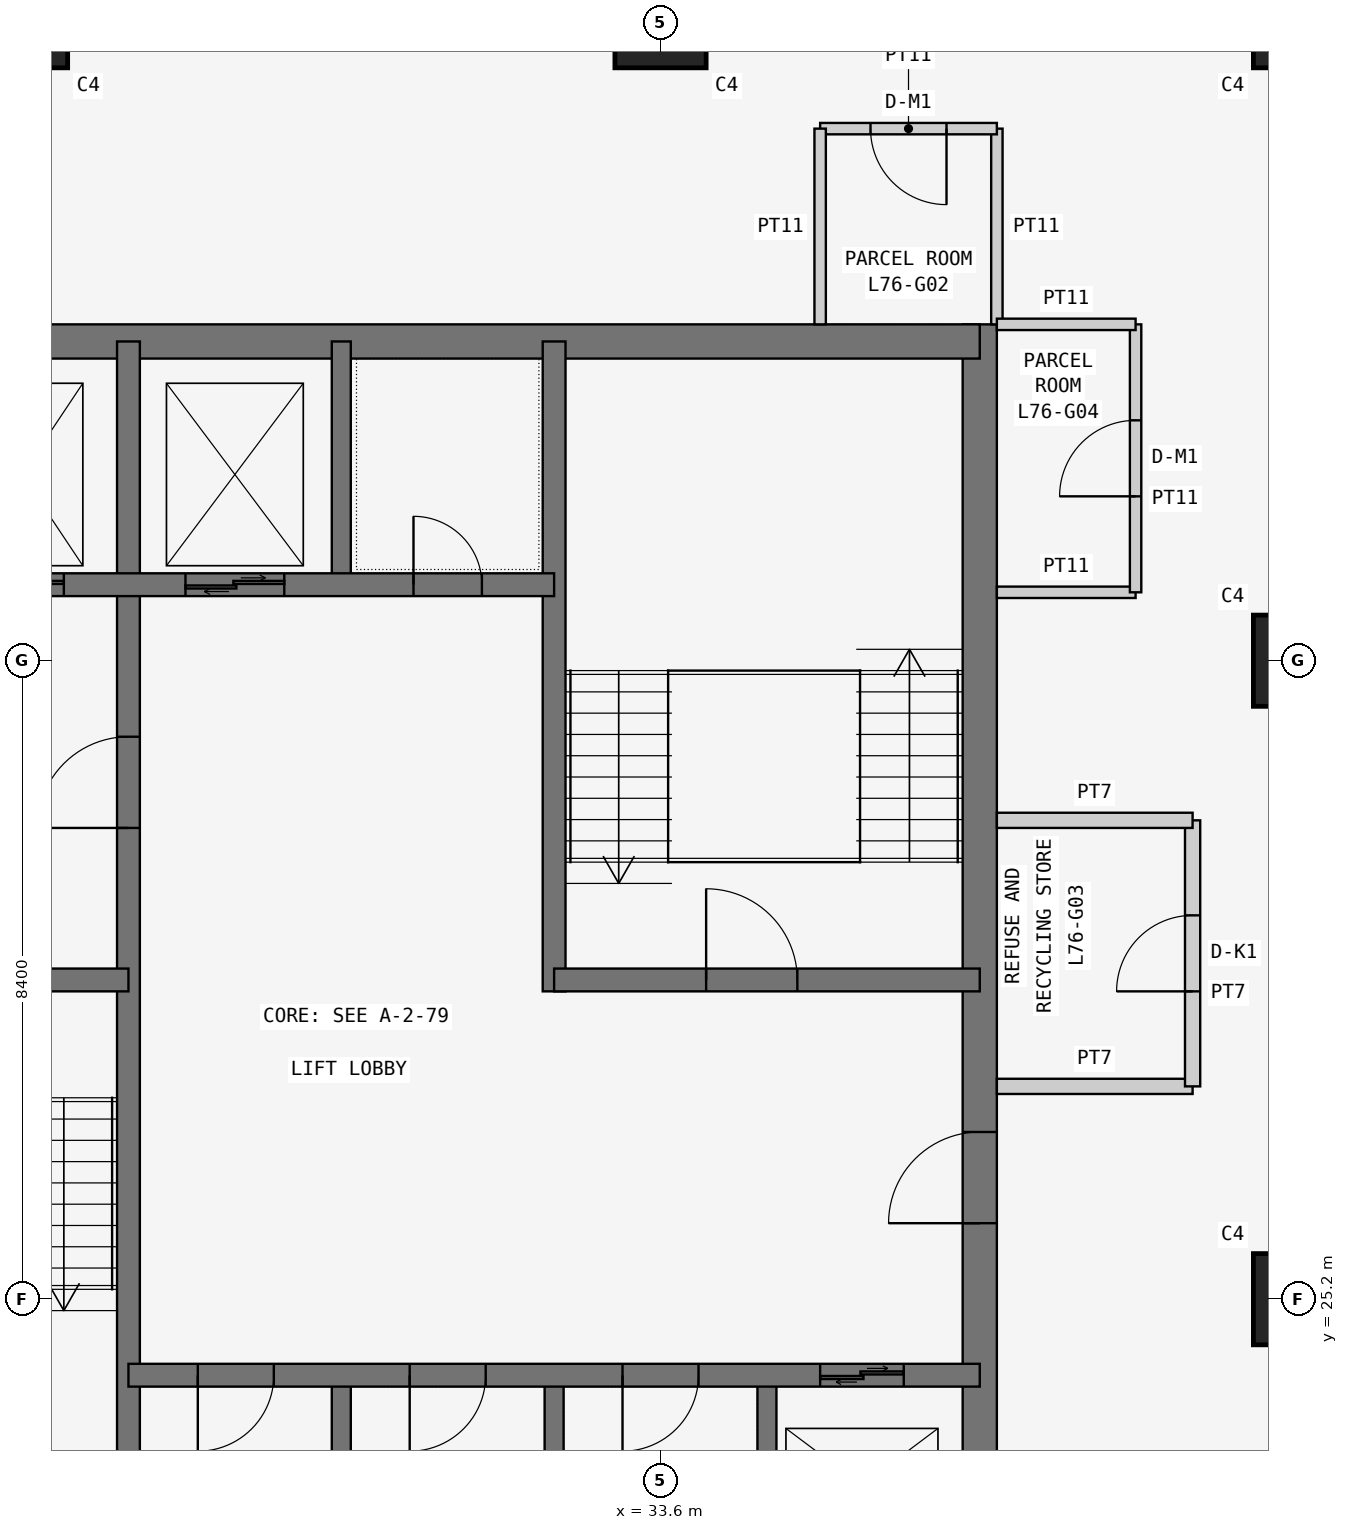
"""IFC4 building model, lengths in metres.
Left out: names, types, materials, properties, quantities, classifications, styles, units other than length and angle.
Written with IfcOpenShell. Run it as: python <this file> out.ifc"""

import sys

from ifc_helpers import new_model, si_unit, direction, frame, frame_2d, origin, origin_2d, place, context, subcontext, project, spatial, rectangle, extrude, element, fill, save


model = new_model("IFC4")
c1 = context("Model", 3, precision=1e-05, world=origin(), true_north=direction((0.0, 1.0)))
c2 = subcontext(c1, "Body", "Model", "MODEL_VIEW")
j1 = project(units=[si_unit("LENGTHUNIT", "METRE"), si_unit("PLANEANGLEUNIT", "RADIAN")], contexts=[c1])
p1 = place(None, origin())
s1 = spatial("IfcSite", under=j1, at=p1, CompositionType="ELEMENT")
p2 = place(p1, origin())
s2 = spatial("IfcBuilding", under=s1, at=p2, CompositionType="ELEMENT")
p3 = place(p2, frame((0.0, 0.0, 290.1)))
s3 = spatial("IfcBuildingStorey", under=s2, at=p3, CompositionType="ELEMENT", Elevation=290.1)
for number, where, z_axis, x_axis in (
    (1, (25.2, 42.0, 0.0), (0.0, 0.0, 1.0), (1.0, 0.0, 0.0)),
    (2, (33.6, 42.0, 0.0), (0.0, 0.0, 1.0), (1.0, 0.0, 0.0)),
    (3, (42.0, 25.2, 0.0), (0.0, 0.0, 1.0), (1.0, 0.0, 0.0)),
    (4, (42.0, 33.6, 0.0), (0.0, 0.0, 1.0), (1.0, 0.0, 0.0)),
    (5, (42.0, 42.0, 0.0), (0.0, 0.0, 1.0), (1.0, 0.0, 0.0)),
):
    element("IfcColumn", number, at=place(p3, frame(where, z_axis=z_axis, x_axis=x_axis)), inside=s3, PredefinedType="COLUMN", context=c2, shape_type="SweptSolid", body=[
        extrude(rectangle(XDim=1.2, YDim=1.2, at=origin_2d()), origin(), (0.0, 0.0, 1.0), 3.6),
    ])
p4 = place(p3, frame((37.8, 21.0, 0.0), z_axis=(0.0, 0.0, 1.0), x_axis=(0.0, 1.0, 0.0)))
e6 = element("IfcWall", 6, at=p4, inside=s3, PredefinedType="SHEAR", context=c2, shape_type="SweptSolid", body=[
    extrude(rectangle(XDim=17.025, YDim=0.45, at=frame_2d((8.512, 0.0))), origin(), (0.0, 0.0, 1.0), 3.6),
])
p5 = place(p4, frame((5.2, 0.0, 0.0)))
e7 = element("IfcOpeningElement", 7, at=p5, cuts=e6, PredefinedType="OPENING", context=c2, shape_type="SweptSolid", body=[
    extrude(rectangle(XDim=1.2, YDim=2.1, at=frame_2d((0.6, 1.05))), frame((0.0, 0.235, 0.0), z_axis=(0.0, -1.0, 0.0), x_axis=(1.0, 0.0, 0.0)), (0.0, 0.0, 1.0), 0.47),
])
p6 = place(p3, frame((37.8, 37.8, 0.0), z_axis=(0.0, 0.0, 1.0), x_axis=(-1.0, 0.0, 0.0)))
e8 = element("IfcWall", 8, at=p6, inside=s3, PredefinedType="SHEAR", context=c2, shape_type="SweptSolid", body=[
    extrude(rectangle(XDim=17.025, YDim=0.45, at=frame_2d((8.513, 0.0))), origin(), (0.0, 0.0, 1.0), 3.6),
])
p7 = place(p3, frame((26.6, 21.0, 0.0), z_axis=(0.0, 0.0, 1.0), x_axis=(0.0, 1.0, 0.0)))
e9 = element("IfcWall", 9, at=p7, inside=s3, PredefinedType="SHEAR", context=c2, shape_type="SweptSolid", body=[
    extrude(rectangle(XDim=16.8, YDim=0.3, at=frame_2d((8.4, 0.0))), origin(), (0.0, 0.0, 1.0), 3.6),
])
p8 = place(p7, frame((10.4, 0.0, 0.0)))
e10 = element("IfcOpeningElement", 10, at=p8, cuts=e9, PredefinedType="OPENING", context=c2, shape_type="SweptSolid", body=[
    extrude(rectangle(XDim=1.2, YDim=2.1, at=frame_2d((0.6, 1.05))), frame((0.0, 0.16, 0.0), z_axis=(0.0, -1.0, 0.0), x_axis=(1.0, 0.0, 0.0)), (0.0, 0.0, 1.0), 0.32),
])
p9 = place(p3, frame((21.0, 29.4, 0.0), z_axis=(0.0, 0.0, 1.0), x_axis=(1.0, 0.0, 0.0)))
e11 = element("IfcWall", 11, at=p9, inside=s3, PredefinedType="SHEAR", context=c2, shape_type="SweptSolid", body=[
    extrude(rectangle(XDim=5.6, YDim=0.3, at=frame_2d((2.8, 0.0))), origin(), (0.0, 0.0, 1.0), 3.6),
])
p10 = place(p9, frame((2.3, 0.0, 0.0)))
e12 = element("IfcOpeningElement", 12, at=p10, cuts=e11, PredefinedType="OPENING", context=c2, shape_type="SweptSolid", body=[
    extrude(rectangle(XDim=1.2, YDim=2.1, at=frame_2d((0.6, 1.05))), frame((0.0, 0.16, 0.0), z_axis=(0.0, -1.0, 0.0), x_axis=(1.0, 0.0, 0.0)), (0.0, 0.0, 1.0), 0.32),
])
p11 = place(p3, frame((21.0, 34.6, 0.0), z_axis=(0.0, 0.0, 1.0), x_axis=(1.0, 0.0, 0.0)))
e13 = element("IfcWall", 13, at=p11, inside=s3, PredefinedType="SHEAR", context=c2, shape_type="SweptSolid", body=[
    extrude(rectangle(XDim=11.2, YDim=0.3, at=frame_2d((5.6, 0.0))), origin(), (0.0, 0.0, 1.0), 3.6),
])
p12 = place(p11, frame((9.35, 0.0, 0.0)))
e14 = element("IfcOpeningElement", 14, at=p12, cuts=e13, PredefinedType="OPENING", context=c2, shape_type="SweptSolid", body=[
    extrude(rectangle(XDim=0.9, YDim=2.1, at=frame_2d((0.45, 1.05))), frame((0.0, 0.16, 0.0), z_axis=(0.0, -1.0, 0.0), x_axis=(1.0, 0.0, 0.0)), (0.0, 0.0, 1.0), 0.32),
])
p13 = place(p11, frame((1.0, 0.0, 0.0)))
e15 = element("IfcOpeningElement", 15, at=p13, cuts=e13, PredefinedType="OPENING", context=c2, shape_type="SweptSolid", body=[
    extrude(rectangle(XDim=1.1, YDim=2.1, at=frame_2d((0.55, 1.05))), frame((0.0, 0.16, 0.0), z_axis=(0.0, -1.0, 0.0), x_axis=(1.0, 0.0, 0.0)), (0.0, 0.0, 1.0), 0.32),
])
p14 = place(p11, frame((3.65, 0.0, 0.0)))
e16 = element("IfcOpeningElement", 16, at=p14, cuts=e13, PredefinedType="OPENING", context=c2, shape_type="SweptSolid", body=[
    extrude(rectangle(XDim=1.1, YDim=2.1, at=frame_2d((0.55, 1.05))), frame((0.0, 0.16, 0.0), z_axis=(0.0, -1.0, 0.0), x_axis=(1.0, 0.0, 0.0)), (0.0, 0.0, 1.0), 0.32),
])
p15 = place(p11, frame((6.35, 0.0, 0.0)))
e17 = element("IfcOpeningElement", 17, at=p15, cuts=e13, PredefinedType="OPENING", context=c2, shape_type="SweptSolid", body=[
    extrude(rectangle(XDim=1.3, YDim=2.1, at=frame_2d((0.65, 1.05))), frame((0.0, 0.16, 0.0), z_axis=(0.0, -1.0, 0.0), x_axis=(1.0, 0.0, 0.0)), (0.0, 0.0, 1.0), 0.32),
])
p16 = place(p3, frame((26.6, 24.2, 0.0), z_axis=(0.0, 0.0, 1.0), x_axis=(1.0, 0.0, 0.0)))
e18 = element("IfcWall", 18, at=p16, inside=s3, PredefinedType="SHEAR", context=c2, shape_type="SweptSolid", body=[
    extrude(rectangle(XDim=11.2, YDim=0.3, at=frame_2d((5.6, 0.0))), origin(), (0.0, 0.0, 1.0), 3.6),
])
p17 = place(p16, frame((0.913, 0.0, 0.0)))
e19 = element("IfcOpeningElement", 19, at=p17, cuts=e18, PredefinedType="OPENING", context=c2, shape_type="SweptSolid", body=[
    extrude(rectangle(XDim=1.0, YDim=2.1, at=frame_2d((0.5, 1.05))), frame((0.0, 0.16, 0.0), z_axis=(0.0, -1.0, 0.0), x_axis=(1.0, 0.0, 0.0)), (0.0, 0.0, 1.0), 0.32),
])
p18 = place(p16, frame((3.7, 0.0, 0.0)))
e20 = element("IfcOpeningElement", 20, at=p18, cuts=e18, PredefinedType="OPENING", context=c2, shape_type="SweptSolid", body=[
    extrude(rectangle(XDim=1.0, YDim=2.1, at=frame_2d((0.5, 1.05))), frame((0.0, 0.16, 0.0), z_axis=(0.0, -1.0, 0.0), x_axis=(1.0, 0.0, 0.0)), (0.0, 0.0, 1.0), 0.32),
])
p19 = place(p16, frame((6.5, 0.0, 0.0)))
e21 = element("IfcOpeningElement", 21, at=p19, cuts=e18, PredefinedType="OPENING", context=c2, shape_type="SweptSolid", body=[
    extrude(rectangle(XDim=1.0, YDim=2.1, at=frame_2d((0.5, 1.05))), frame((0.0, 0.16, 0.0), z_axis=(0.0, -1.0, 0.0), x_axis=(1.0, 0.0, 0.0)), (0.0, 0.0, 1.0), 0.32),
])
p20 = place(p16, frame((9.1, 0.0, 0.0)))
e22 = element("IfcOpeningElement", 22, at=p20, cuts=e18, PredefinedType="OPENING", context=c2, shape_type="SweptSolid", body=[
    extrude(rectangle(XDim=1.1, YDim=2.1, at=frame_2d((0.55, 1.05))), frame((0.0, 0.16, 0.0), z_axis=(0.0, -1.0, 0.0), x_axis=(1.0, 0.0, 0.0)), (0.0, 0.0, 1.0), 0.32),
])
p21 = place(p3, frame((32.2, 29.25, 0.0), z_axis=(0.0, 0.0, 1.0), x_axis=(0.0, 1.0, 0.0)))
e23 = element("IfcWall", 23, at=p21, inside=s3, PredefinedType="SHEAR", context=c2, shape_type="SweptSolid", body=[
    extrude(rectangle(XDim=8.55, YDim=0.3, at=frame_2d((4.275, 0.0))), origin(), (0.0, 0.0, 1.0), 3.6),
])
p22 = place(p3, frame((32.2, 29.4, 0.0), z_axis=(0.0, 0.0, 1.0), x_axis=(1.0, 0.0, 0.0)))
e24 = element("IfcWall", 24, at=p22, inside=s3, PredefinedType="SHEAR", context=c2, shape_type="SweptSolid", body=[
    extrude(rectangle(XDim=5.6, YDim=0.3, at=frame_2d((2.8, 0.0))), origin(), (0.0, 0.0, 1.0), 3.6),
])
p23 = place(p22, frame((2.0, 0.0, 0.0)))
e25 = element("IfcOpeningElement", 25, at=p23, cuts=e24, PredefinedType="OPENING", context=c2, shape_type="SweptSolid", body=[
    extrude(rectangle(XDim=1.2, YDim=2.1, at=frame_2d((0.6, 1.05))), frame((0.0, 0.16, 0.0), z_axis=(0.0, -1.0, 0.0), x_axis=(1.0, 0.0, 0.0)), (0.0, 0.0, 1.0), 0.32),
])
for number, where, z_axis, x_axis in (
    (26, (29.4, 21.0, 0.0), (0.0, 0.0, 1.0), (0.0, 1.0, 0.0)),
    (27, (32.2, 21.0, 0.0), (0.0, 0.0, 1.0), (0.0, 1.0, 0.0)),
    (28, (35.0, 21.0, 0.0), (0.0, 0.0, 1.0), (0.0, 1.0, 0.0)),
    (29, (29.4, 34.6, 0.0), (0.0, 0.0, 1.0), (0.0, 1.0, 0.0)),
):
    element("IfcWall", number, at=place(p3, frame(where, z_axis=z_axis, x_axis=x_axis)), inside=s3, PredefinedType="SHEAR", context=c2, shape_type="SweptSolid", body=[
        extrude(rectangle(XDim=3.2, YDim=0.25, at=frame_2d((1.6, 0.0))), origin(), (0.0, 0.0, 1.0), 3.6),
    ])
p24 = place(p3, frame((38.025, 38.025, 0.0), z_axis=(0.0, 0.0, 1.0), x_axis=(0.0, 1.0, 0.0)))
e30 = element("IfcWall", 30, at=p24, inside=s3, PredefinedType="PARTITIONING", context=c2, shape_type="SweptSolid", body=[
    extrude(rectangle(XDim=2.575, YDim=0.15, at=frame_2d((1.288, 0.0))), origin(), (0.0, 0.0, 1.0), 3.45),
])
p25 = place(p3, frame((38.025, 40.6, 0.0), z_axis=(0.0, 0.0, 1.0), x_axis=(-1.0, 0.0, 0.0)))
e31 = element("IfcWall", 31, at=p25, inside=s3, PredefinedType="PARTITIONING", context=c2, shape_type="SweptSolid", body=[
    extrude(rectangle(XDim=2.325, YDim=0.15, at=frame_2d((1.163, 0.0))), origin(), (0.0, 0.0, 1.0), 3.45),
])
p26 = place(p25, frame((0.663, 0.0, 0.0)))
e32 = element("IfcOpeningElement", 32, at=p26, cuts=e31, PredefinedType="OPENING", context=c2, shape_type="SweptSolid", body=[
    extrude(rectangle(XDim=1.0, YDim=2.1, at=frame_2d((0.5, 1.05))), frame((0.0, 0.085, 0.0), z_axis=(0.0, -1.0, 0.0), x_axis=(1.0, 0.0, 0.0)), (0.0, 0.0, 1.0), 0.17),
])
p27 = place(p3, frame((35.7, 40.6, 0.0), z_axis=(0.0, 0.0, 1.0), x_axis=(0.0, -1.0, 0.0)))
e33 = element("IfcWall", 33, at=p27, inside=s3, PredefinedType="PARTITIONING", context=c2, shape_type="SweptSolid", body=[
    extrude(rectangle(XDim=2.575, YDim=0.15, at=frame_2d((1.288, 0.0))), origin(), (0.0, 0.0, 1.0), 3.45),
])
p28 = place(p3, frame((38.025, 28.0, 0.0), z_axis=(0.0, 0.0, 1.0), x_axis=(1.0, 0.0, 0.0)))
e34 = element("IfcWall", 34, at=p28, inside=s3, PredefinedType="PARTITIONING", context=c2, shape_type="SweptSolid", body=[
    extrude(rectangle(XDim=2.575, YDim=0.2, at=frame_2d((1.288, 0.0))), origin(), (0.0, 0.0, 1.0), 3.45),
])
p29 = place(p3, frame((40.6, 28.0, 0.0), z_axis=(0.0, 0.0, 1.0), x_axis=(0.0, 1.0, 0.0)))
e35 = element("IfcWall", 35, at=p29, inside=s3, PredefinedType="PARTITIONING", context=c2, shape_type="SweptSolid", body=[
    extrude(rectangle(XDim=3.5, YDim=0.2, at=frame_2d((1.75, 0.0))), origin(), (0.0, 0.0, 1.0), 3.45),
])
p30 = place(p29, frame((1.25, 0.0, 0.0)))
e36 = element("IfcOpeningElement", 36, at=p30, cuts=e35, PredefinedType="OPENING", context=c2, shape_type="SweptSolid", body=[
    extrude(rectangle(XDim=1.0, YDim=2.1, at=frame_2d((0.5, 1.05))), frame((0.0, 0.11, 0.0), z_axis=(0.0, -1.0, 0.0), x_axis=(1.0, 0.0, 0.0)), (0.0, 0.0, 1.0), 0.22),
])
p31 = place(p3, frame((40.6, 31.5, 0.0), z_axis=(0.0, 0.0, 1.0), x_axis=(-1.0, 0.0, 0.0)))
e37 = element("IfcWall", 37, at=p31, inside=s3, PredefinedType="PARTITIONING", context=c2, shape_type="SweptSolid", body=[
    extrude(rectangle(XDim=2.575, YDim=0.2, at=frame_2d((1.288, 0.0))), origin(), (0.0, 0.0, 1.0), 3.45),
])
p32 = place(p3, frame((38.025, 34.5, 0.0), z_axis=(0.0, 0.0, 1.0), x_axis=(1.0, 0.0, 0.0)))
e38 = element("IfcWall", 38, at=p32, inside=s3, PredefinedType="PARTITIONING", context=c2, shape_type="SweptSolid", body=[
    extrude(rectangle(XDim=1.825, YDim=0.15, at=frame_2d((0.913, 0.0))), origin(), (0.0, 0.0, 1.0), 3.45),
])
p33 = place(p3, frame((39.85, 34.5, 0.0), z_axis=(0.0, 0.0, 1.0), x_axis=(0.0, 1.0, 0.0)))
e39 = element("IfcWall", 39, at=p33, inside=s3, PredefinedType="PARTITIONING", context=c2, shape_type="SweptSolid", body=[
    extrude(rectangle(XDim=3.525, YDim=0.15, at=frame_2d((1.762, 0.0))), origin(), (0.0, 0.0, 1.0), 3.45),
])
p34 = place(p33, frame((1.262, 0.0, 0.0)))
e40 = element("IfcOpeningElement", 40, at=p34, cuts=e39, PredefinedType="OPENING", context=c2, shape_type="SweptSolid", body=[
    extrude(rectangle(XDim=1.0, YDim=2.1, at=frame_2d((0.5, 1.05))), frame((0.0, 0.085, 0.0), z_axis=(0.0, -1.0, 0.0), x_axis=(1.0, 0.0, 0.0)), (0.0, 0.0, 1.0), 0.17),
])
p35 = place(p3, frame((39.85, 38.025, 0.0), z_axis=(0.0, 0.0, 1.0), x_axis=(-1.0, 0.0, 0.0)))
e41 = element("IfcWall", 41, at=p35, inside=s3, PredefinedType="PARTITIONING", context=c2, shape_type="SweptSolid", body=[
    extrude(rectangle(XDim=1.825, YDim=0.15, at=frame_2d((0.913, 0.0))), origin(), (0.0, 0.0, 1.0), 3.45),
])
p36 = place(p26, origin())
e42 = element("IfcDoor", 42, at=p36, inside=s3, OperationType="SINGLE_SWING_LEFT", PredefinedType="DOOR", context=c2, shape_type="SweptSolid", body=[
    extrude(rectangle(XDim=1.0, YDim=2.1, at=frame_2d((0.5, 1.05))), frame((0.0, 0.025, 0.0), z_axis=(0.0, -1.0, 0.0), x_axis=(1.0, 0.0, 0.0)), (0.0, 0.0, 1.0), 0.05),
])
fill(e32, e42)
p37 = place(p30, origin())
e43 = element("IfcDoor", 43, at=p37, inside=s3, OperationType="SINGLE_SWING_LEFT", PredefinedType="DOOR", context=c2, shape_type="SweptSolid", body=[
    extrude(rectangle(XDim=1.0, YDim=2.1, at=frame_2d((0.5, 1.05))), frame((0.0, 0.025, 0.0), z_axis=(0.0, -1.0, 0.0), x_axis=(1.0, 0.0, 0.0)), (0.0, 0.0, 1.0), 0.05),
])
fill(e36, e43)
p38 = place(p34, origin())
e44 = element("IfcDoor", 44, at=p38, inside=s3, OperationType="SINGLE_SWING_LEFT", PredefinedType="DOOR", context=c2, shape_type="SweptSolid", body=[
    extrude(rectangle(XDim=1.0, YDim=2.1, at=frame_2d((0.5, 1.05))), frame((0.0, 0.025, 0.0), z_axis=(0.0, -1.0, 0.0), x_axis=(1.0, 0.0, 0.0)), (0.0, 0.0, 1.0), 0.05),
])
fill(e40, e44)
p39 = place(p8, origin())
e45 = element("IfcDoor", 45, at=p39, inside=s3, OperationType="SINGLE_SWING_LEFT", PredefinedType="DOOR", context=c2, shape_type="SweptSolid", body=[
    extrude(rectangle(XDim=1.2, YDim=2.1, at=frame_2d((0.6, 1.05))), frame((0.0, 0.025, 0.0), z_axis=(0.0, -1.0, 0.0), x_axis=(1.0, 0.0, 0.0)), (0.0, 0.0, 1.0), 0.05),
])
fill(e10, e45)
p40 = place(p5, origin())
e46 = element("IfcDoor", 46, at=p40, inside=s3, OperationType="SINGLE_SWING_LEFT", PredefinedType="DOOR", context=c2, shape_type="SweptSolid", body=[
    extrude(rectangle(XDim=1.2, YDim=2.1, at=frame_2d((0.6, 1.05))), frame((0.0, 0.025, 0.0), z_axis=(0.0, -1.0, 0.0), x_axis=(1.0, 0.0, 0.0)), (0.0, 0.0, 1.0), 0.05),
])
fill(e7, e46)
p41 = place(p23, origin())
e47 = element("IfcDoor", 47, at=p41, inside=s3, OperationType="SINGLE_SWING_LEFT", PredefinedType="DOOR", context=c2, shape_type="SweptSolid", body=[
    extrude(rectangle(XDim=1.2, YDim=2.1, at=frame_2d((0.6, 1.05))), frame((0.0, 0.025, 0.0), z_axis=(0.0, -1.0, 0.0), x_axis=(1.0, 0.0, 0.0)), (0.0, 0.0, 1.0), 0.05),
])
fill(e25, e47)
p42 = place(p12, origin())
e48 = element("IfcDoor", 48, at=p42, inside=s3, OperationType="SINGLE_SWING_LEFT", PredefinedType="DOOR", context=c2, shape_type="SweptSolid", body=[
    extrude(rectangle(XDim=0.9, YDim=2.1, at=frame_2d((0.45, 1.05))), frame((0.0, 0.025, 0.0), z_axis=(0.0, -1.0, 0.0), x_axis=(1.0, 0.0, 0.0)), (0.0, 0.0, 1.0), 0.05),
])
fill(e14, e48)
p43 = place(p17, frame((1.0, 0.0, 0.0), z_axis=(0.0, 0.0, 1.0), x_axis=(-1.0, 0.0, 0.0)))
e49 = element("IfcDoor", 49, at=p43, inside=s3, OperationType="SINGLE_SWING_RIGHT", PredefinedType="DOOR", context=c2, shape_type="SweptSolid", body=[
    extrude(rectangle(XDim=1.0, YDim=2.1, at=frame_2d((0.5, 1.05))), frame((0.0, 0.025, 0.0), z_axis=(0.0, -1.0, 0.0), x_axis=(1.0, 0.0, 0.0)), (0.0, 0.0, 1.0), 0.05),
])
fill(e19, e49)
p44 = place(p18, frame((1.0, 0.0, 0.0), z_axis=(0.0, 0.0, 1.0), x_axis=(-1.0, 0.0, 0.0)))
e50 = element("IfcDoor", 50, at=p44, inside=s3, OperationType="SINGLE_SWING_RIGHT", PredefinedType="DOOR", context=c2, shape_type="SweptSolid", body=[
    extrude(rectangle(XDim=1.0, YDim=2.1, at=frame_2d((0.5, 1.05))), frame((0.0, 0.025, 0.0), z_axis=(0.0, -1.0, 0.0), x_axis=(1.0, 0.0, 0.0)), (0.0, 0.0, 1.0), 0.05),
])
fill(e20, e50)
p45 = place(p19, frame((1.0, 0.0, 0.0), z_axis=(0.0, 0.0, 1.0), x_axis=(-1.0, 0.0, 0.0)))
e51 = element("IfcDoor", 51, at=p45, inside=s3, OperationType="SINGLE_SWING_RIGHT", PredefinedType="DOOR", context=c2, shape_type="SweptSolid", body=[
    extrude(rectangle(XDim=1.0, YDim=2.1, at=frame_2d((0.5, 1.05))), frame((0.0, 0.025, 0.0), z_axis=(0.0, -1.0, 0.0), x_axis=(1.0, 0.0, 0.0)), (0.0, 0.0, 1.0), 0.05),
])
fill(e21, e51)
p46 = place(p20, origin())
e52 = element("IfcDoor", 52, at=p46, inside=s3, OperationType="DOUBLE_DOOR_SLIDING", PredefinedType="DOOR", context=c2, shape_type="SweptSolid", body=[
    extrude(rectangle(XDim=1.1, YDim=2.1, at=frame_2d((0.55, 1.05))), frame((0.0, 0.025, 0.0), z_axis=(0.0, -1.0, 0.0), x_axis=(1.0, 0.0, 0.0)), (0.0, 0.0, 1.0), 0.05),
])
fill(e22, e52)
p47 = place(p14, origin())
e53 = element("IfcDoor", 53, at=p47, inside=s3, OperationType="DOUBLE_DOOR_SLIDING", PredefinedType="DOOR", context=c2, shape_type="SweptSolid", body=[
    extrude(rectangle(XDim=1.1, YDim=2.1, at=frame_2d((0.55, 1.05))), frame((0.0, 0.025, 0.0), z_axis=(0.0, -1.0, 0.0), x_axis=(1.0, 0.0, 0.0)), (0.0, 0.0, 1.0), 0.05),
])
fill(e16, e53)
p48 = place(p15, origin())
e54 = element("IfcDoor", 54, at=p48, inside=s3, OperationType="DOUBLE_DOOR_SLIDING", PredefinedType="DOOR", context=c2, shape_type="SweptSolid", body=[
    extrude(rectangle(XDim=1.3, YDim=2.1, at=frame_2d((0.65, 1.05))), frame((0.0, 0.025, 0.0), z_axis=(0.0, -1.0, 0.0), x_axis=(1.0, 0.0, 0.0)), (0.0, 0.0, 1.0), 0.05),
])
fill(e17, e54)
save(model, sys.argv[1])
